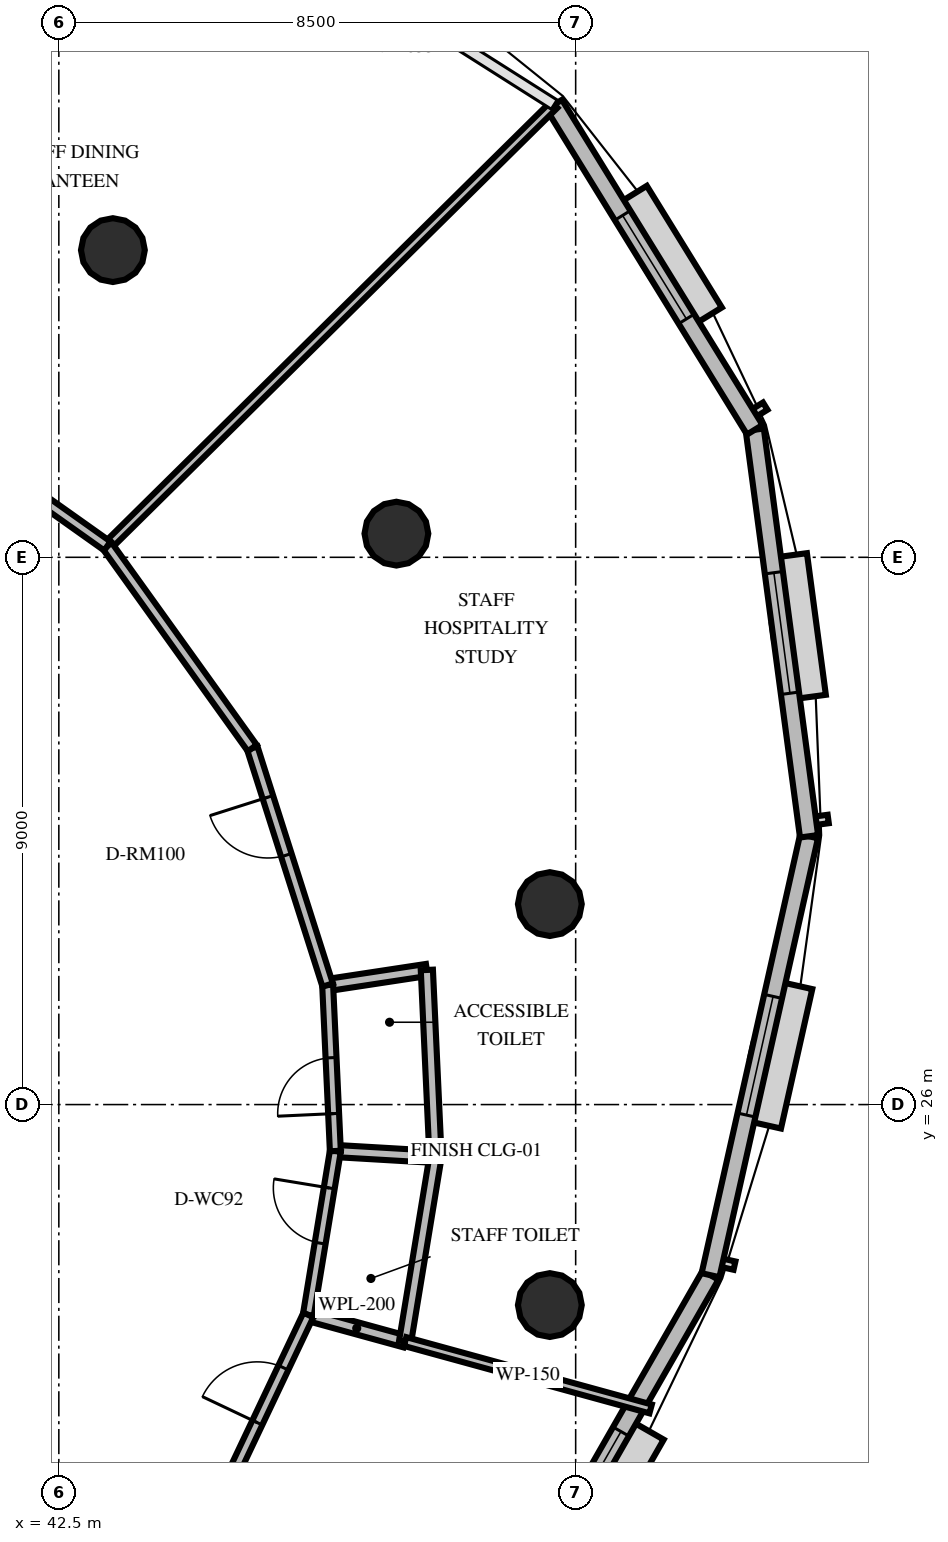
"""IFC4 building model, lengths in metres.
Left out: names, types, materials, properties, quantities, classifications, styles, units other than length and angle.
Written with IfcOpenShell. Run it as: python <this file> out.ifc"""

import sys

from ifc_helpers import new_model, si_unit, direction, frame, frame_2d, origin, origin_2d, place, context, subcontext, project, spatial, rectangle, circle, extrude, element, fill, save


model = new_model("IFC4")
c1 = context("Model", 3, precision=1e-05, world=origin(), true_north=direction((0.0, 1.0)))
c2 = subcontext(c1, "Body", "Model", "MODEL_VIEW")
j1 = project(units=[si_unit("LENGTHUNIT", "METRE"), si_unit("PLANEANGLEUNIT", "RADIAN")], contexts=[c1])
p1 = place(None, origin())
s1 = spatial("IfcSite", under=j1, at=p1, CompositionType="ELEMENT")
p2 = place(p1, origin())
s2 = spatial("IfcBuilding", under=s1, at=p2, CompositionType="ELEMENT")
p3 = place(p2, frame((0.0, 0.0, 216.8)))
s3 = spatial("IfcBuildingStorey", under=s2, at=p3, CompositionType="ELEMENT", Elevation=216.8)
for number, where, z_axis, x_axis in (
    (1, (50.575, 29.297, 0.0), (0.0, 0.0, 1.0), (1.0, 0.0, 0.0)),
    (2, (48.052, 35.389, 0.0), (0.0, 0.0, 1.0), (1.0, 0.0, 0.0)),
    (3, (43.389, 40.052, 0.0), (0.0, 0.0, 1.0), (1.0, 0.0, 0.0)),
    (4, (50.575, 22.703, 0.0), (0.0, 0.0, 1.0), (1.0, 0.0, 0.0)),
):
    element("IfcColumn", number, at=place(p3, frame(where, z_axis=z_axis, x_axis=x_axis)), inside=s3, PredefinedType="COLUMN", context=c2, shape_type="SweptSolid", body=[
        extrude(circle(Radius=0.525, at=origin_2d()), origin(), (0.0, 0.0, 1.0), 3.6),
    ])
p4 = place(p3, frame((49.279, 16.315, 0.0), z_axis=(0.0, 0.0, 1.0), x_axis=(0.496841929848, 0.867841055001, 0.0)))
e5 = element("IfcWall", 5, at=p4, inside=s3, PredefinedType="SOLIDWALL", context=c2, shape_type="SweptSolid", body=[
    extrude(rectangle(XDim=7.927, YDim=0.3, at=frame_2d((3.963, 0.0))), origin(), (0.0, 0.0, 1.0), 2.56),
])
p5 = place(p4, frame((2.964, 0.0, 0.8)))
e6 = element("IfcOpeningElement", 6, at=p5, cuts=e5, PredefinedType="OPENING", context=c2, shape_type="SweptSolid", body=[
    extrude(rectangle(XDim=2.0, YDim=1.85, at=frame_2d((1.0, 0.925))), frame((0.0, 0.16, 0.0), z_axis=(0.0, -1.0, 0.0), x_axis=(1.0, 0.0, 0.0)), (0.0, 0.0, 1.0), 0.32),
])
p6 = place(p3, frame((53.218, 23.194, 0.0), z_axis=(0.0, 0.0, 1.0), x_axis=(0.219068478611, 0.975709486312, 0.0)))
e7 = element("IfcWall", 7, at=p6, inside=s3, PredefinedType="SOLIDWALL", context=c2, shape_type="SweptSolid", body=[
    extrude(rectangle(XDim=7.398, YDim=0.3, at=frame_2d((3.699, 0.0))), origin(), (0.0, 0.0, 1.0), 2.56),
])
p7 = place(p6, frame((2.699, 0.0, 0.8)))
e8 = element("IfcOpeningElement", 8, at=p7, cuts=e7, PredefinedType="OPENING", context=c2, shape_type="SweptSolid", body=[
    extrude(rectangle(XDim=2.0, YDim=1.85, at=frame_2d((1.0, 0.925))), frame((0.0, 0.16, 0.0), z_axis=(0.0, -1.0, 0.0), x_axis=(1.0, 0.0, 0.0)), (0.0, 0.0, 1.0), 0.32),
])
p8 = place(p3, frame((54.838, 30.412, 0.0), z_axis=(0.0, 0.0, 1.0), x_axis=(-0.13236523993, 0.991201010521, 0.0)))
e9 = element("IfcWall", 9, at=p8, inside=s3, PredefinedType="SOLIDWALL", context=c2, shape_type="SweptSolid", body=[
    extrude(rectangle(XDim=6.745, YDim=0.3, at=frame_2d((3.373, 0.0))), origin(), (0.0, 0.0, 1.0), 2.56),
])
p9 = place(p8, frame((2.373, 0.0, 0.8)))
e10 = element("IfcOpeningElement", 10, at=p9, cuts=e9, PredefinedType="OPENING", context=c2, shape_type="SweptSolid", body=[
    extrude(rectangle(XDim=2.0, YDim=1.85, at=frame_2d((1.0, 0.925))), frame((0.0, 0.16, 0.0), z_axis=(0.0, -1.0, 0.0), x_axis=(1.0, 0.0, 0.0)), (0.0, 0.0, 1.0), 0.32),
])
p10 = place(p3, frame((53.946, 37.098, 0.0), z_axis=(0.0, 0.0, 1.0), x_axis=(-0.52501210794, 0.85109475766, 0.0)))
e11 = element("IfcWall", 11, at=p10, inside=s3, PredefinedType="SOLIDWALL", context=c2, shape_type="SweptSolid", body=[
    extrude(rectangle(XDim=6.282, YDim=0.3, at=frame_2d((3.141, 0.0))), origin(), (0.0, 0.0, 1.0), 2.56),
])
p11 = place(p10, frame((2.141, 0.0, 0.8)))
e12 = element("IfcOpeningElement", 12, at=p11, cuts=e11, PredefinedType="OPENING", context=c2, shape_type="SweptSolid", body=[
    extrude(rectangle(XDim=2.0, YDim=1.85, at=frame_2d((1.0, 0.925))), frame((0.0, 0.16, 0.0), z_axis=(0.0, -1.0, 0.0), x_axis=(1.0, 0.0, 0.0)), (0.0, 0.0, 1.0), 0.32),
])
p12 = place(p3, frame((46.604, 22.54, 0.0), z_axis=(0.0, 0.0, 1.0), x_axis=(0.964325407266, -0.264719679853, 0.0)))
e13 = element("IfcWall", 13, at=p12, inside=s3, PredefinedType="PLUMBINGWALL", context=c2, shape_type="SweptSolid", body=[
    extrude(rectangle(XDim=1.65, YDim=0.2, at=frame_2d((0.825, 0.0))), origin(), (0.0, 0.0, 1.0), 2.45),
])
p13 = place(p3, frame((47.048, 25.236, 0.0), z_axis=(0.0, 0.0, 1.0), x_axis=(0.998290661285, -0.058444465867, 0.0)))
e14 = element("IfcWall", 14, at=p13, inside=s3, PredefinedType="PLUMBINGWALL", context=c2, shape_type="SweptSolid", body=[
    extrude(rectangle(XDim=1.65, YDim=0.2, at=frame_2d((0.825, 0.0))), origin(), (0.0, 0.0, 1.0), 2.45),
])
p14 = place(p3, frame((48.195, 22.104, 0.0), z_axis=(0.0, 0.0, 1.0), x_axis=(0.162481728675, 0.986711552505, 0.0)))
e15 = element("IfcWall", 15, at=p14, inside=s3, PredefinedType="PLUMBINGWALL", context=c2, shape_type="SweptSolid", body=[
    extrude(rectangle(XDim=3.077, YDim=0.2, at=frame_2d((1.539, 0.0))), origin(), (0.0, 0.0, 1.0), 2.45),
])
p15 = place(p3, frame((46.604, 22.54, 0.0), z_axis=(0.0, 0.0, 1.0), x_axis=(0.162442572065, 0.986717999623, 0.0)))
e16 = element("IfcWall", 16, at=p15, inside=s3, PredefinedType="PARTITIONING", context=c2, shape_type="SweptSolid", body=[
    extrude(rectangle(XDim=2.732, YDim=0.18, at=frame_2d((1.366, 0.0))), origin(), (0.0, 0.0, 1.0), 2.45),
])
p16 = place(p15, frame((1.197, 0.0, 0.0)))
e17 = element("IfcOpeningElement", 17, at=p16, cuts=e16, PredefinedType="OPENING", context=c2, shape_type="SweptSolid", body=[
    extrude(rectangle(XDim=0.92, YDim=2.1, at=frame_2d((0.46, 1.05))), frame((0.0, 0.1, 0.0), z_axis=(0.0, -1.0, 0.0), x_axis=(1.0, 0.0, 0.0)), (0.0, 0.0, 1.0), 0.2),
])
p17 = place(p3, frame((46.921, 27.966, 0.0), z_axis=(0.0, 0.0, 1.0), x_axis=(0.9886336644, 0.150344529716, 0.0)))
e18 = element("IfcWall", 18, at=p17, inside=s3, PredefinedType="PLUMBINGWALL", context=c2, shape_type="SweptSolid", body=[
    extrude(rectangle(XDim=1.65, YDim=0.2, at=frame_2d((0.825, 0.0))), origin(), (0.0, 0.0, 1.0), 2.45),
])
p18 = place(p3, frame((48.695, 25.14, 0.0), z_axis=(0.0, 0.0, 1.0), x_axis=(-0.046253358654, 0.998929740679, 0.0)))
e19 = element("IfcWall", 19, at=p18, inside=s3, PredefinedType="PLUMBINGWALL", context=c2, shape_type="SweptSolid", body=[
    extrude(rectangle(XDim=3.077, YDim=0.2, at=frame_2d((1.539, 0.0))), origin(), (0.0, 0.0, 1.0), 2.45),
])
p19 = place(p3, frame((47.048, 25.236, 0.0), z_axis=(0.0, 0.0, 1.0), x_axis=(-0.046193926453, 0.998932490791, 0.0)))
e20 = element("IfcWall", 20, at=p19, inside=s3, PredefinedType="PARTITIONING", context=c2, shape_type="SweptSolid", body=[
    extrude(rectangle(XDim=2.732, YDim=0.18, at=frame_2d((1.366, 0.0))), origin(), (0.0, 0.0, 1.0), 2.45),
])
p20 = place(p19, frame((0.616, 0.0, 0.0)))
e21 = element("IfcOpeningElement", 21, at=p20, cuts=e20, PredefinedType="OPENING", context=c2, shape_type="SweptSolid", body=[
    extrude(rectangle(XDim=0.92, YDim=2.1, at=frame_2d((0.46, 1.05))), frame((0.0, 0.1, 0.0), z_axis=(0.0, -1.0, 0.0), x_axis=(1.0, 0.0, 0.0)), (0.0, 0.0, 1.0), 0.2),
])
p21 = place(p3, frame((48.195, 22.104, 0.0), z_axis=(0.0, 0.0, 1.0), x_axis=(0.964331984238, -0.264695719978, 0.0)))
e22 = element("IfcWall", 22, at=p21, inside=s3, PredefinedType="PARTITIONING", context=c2, shape_type="SweptSolid", body=[
    extrude(rectangle(XDim=4.188, YDim=0.15, at=frame_2d((2.094, 0.0))), origin(), (0.0, 0.0, 1.0), 2.45),
])
p22 = place(p3, frame((43.298, 35.185, 0.0), z_axis=(0.0, 0.0, 1.0), x_axis=(0.711430318558, 0.702756644818, 0.0)))
e23 = element("IfcWall", 23, at=p22, inside=s3, PredefinedType="PARTITIONING", context=c2, shape_type="SweptSolid", body=[
    extrude(rectangle(XDim=10.33, YDim=0.15, at=frame_2d((5.165, 0.0))), origin(), (0.0, 0.0, 1.0), 2.45),
])
p23 = place(p3, frame((46.921, 27.966, 0.0), z_axis=(0.0, 0.0, 1.0), x_axis=(-0.30324801656, 0.952911664559, 0.0)))
e24 = element("IfcWall", 24, at=p23, inside=s3, PredefinedType="PARTITIONING", context=c2, shape_type="SweptSolid", body=[
    extrude(rectangle(XDim=4.089, YDim=0.18, at=frame_2d((2.044, 0.0))), origin(), (0.0, 0.0, 1.0), 2.45),
])
p24 = place(p23, frame((2.242, 0.0, 0.0)))
e25 = element("IfcOpeningElement", 25, at=p24, cuts=e24, PredefinedType="OPENING", context=c2, shape_type="SweptSolid", body=[
    extrude(rectangle(XDim=1.0, YDim=2.15, at=frame_2d((0.5, 1.075))), frame((0.0, 0.1, 0.0), z_axis=(0.0, -1.0, 0.0), x_axis=(1.0, 0.0, 0.0)), (0.0, 0.0, 1.0), 0.2),
])
p25 = place(p3, frame((45.681, 31.862, 0.0), z_axis=(0.0, 0.0, 1.0), x_axis=(-0.58281275777, 0.812606478796, 0.0)))
e26 = element("IfcWall", 26, at=p25, inside=s3, PredefinedType="PARTITIONING", context=c2, shape_type="SweptSolid", body=[
    extrude(rectangle(XDim=4.089, YDim=0.18, at=frame_2d((2.045, 0.0))), origin(), (0.0, 0.0, 1.0), 2.45),
])
p26 = place(p3, frame((43.298, 35.185, 0.0), z_axis=(0.0, 0.0, 1.0), x_axis=(-0.815622593255, 0.578584294094, 0.0)))
e27 = element("IfcWall", 27, at=p26, inside=s3, PredefinedType="PARTITIONING", context=c2, shape_type="SweptSolid", body=[
    extrude(rectangle(XDim=4.539, YDim=0.18, at=frame_2d((2.27, 0.0))), origin(), (0.0, 0.0, 1.0), 2.45),
])
p27 = place(p3, frame((44.66, 18.438, 0.0), z_axis=(0.0, 0.0, 1.0), x_axis=(0.428116399969, 0.903723601594, 0.0)))
e28 = element("IfcWall", 28, at=p27, inside=s3, PredefinedType="PARTITIONING", context=c2, shape_type="SweptSolid", body=[
    extrude(rectangle(XDim=4.539, YDim=0.18, at=frame_2d((2.27, 0.0))), origin(), (0.0, 0.0, 1.0), 2.45),
])
p28 = place(p27, frame((2.579, 0.0, 0.0)))
e29 = element("IfcOpeningElement", 29, at=p28, cuts=e28, PredefinedType="OPENING", context=c2, shape_type="SweptSolid", body=[
    extrude(rectangle(XDim=1.0, YDim=2.15, at=frame_2d((0.5, 1.075))), frame((0.0, 0.1, 0.0), z_axis=(0.0, -1.0, 0.0), x_axis=(1.0, 0.0, 0.0)), (0.0, 0.0, 1.0), 0.2),
])
p29 = place(p5, origin())
e30 = element("IfcWindow", 30, at=p29, inside=s3, PartitioningType="SINGLE_PANEL", PredefinedType="WINDOW", context=c2, shape_type="SweptSolid", body=[
    extrude(rectangle(XDim=2.0, YDim=1.85, at=frame_2d((1.0, 0.925))), frame((0.0, 0.03, 0.0), z_axis=(0.0, -1.0, 0.0), x_axis=(1.0, 0.0, 0.0)), (0.0, 0.0, 1.0), 0.06),
])
fill(e6, e30)
p30 = place(p7, origin())
e31 = element("IfcWindow", 31, at=p30, inside=s3, PartitioningType="SINGLE_PANEL", PredefinedType="WINDOW", context=c2, shape_type="SweptSolid", body=[
    extrude(rectangle(XDim=2.0, YDim=1.85, at=frame_2d((1.0, 0.925))), frame((0.0, 0.03, 0.0), z_axis=(0.0, -1.0, 0.0), x_axis=(1.0, 0.0, 0.0)), (0.0, 0.0, 1.0), 0.06),
])
fill(e8, e31)
p31 = place(p9, origin())
e32 = element("IfcWindow", 32, at=p31, inside=s3, PartitioningType="SINGLE_PANEL", PredefinedType="WINDOW", context=c2, shape_type="SweptSolid", body=[
    extrude(rectangle(XDim=2.0, YDim=1.85, at=frame_2d((1.0, 0.925))), frame((0.0, 0.03, 0.0), z_axis=(0.0, -1.0, 0.0), x_axis=(1.0, 0.0, 0.0)), (0.0, 0.0, 1.0), 0.06),
])
fill(e10, e32)
p32 = place(p11, origin())
e33 = element("IfcWindow", 33, at=p32, inside=s3, PartitioningType="SINGLE_PANEL", PredefinedType="WINDOW", context=c2, shape_type="SweptSolid", body=[
    extrude(rectangle(XDim=2.0, YDim=1.85, at=frame_2d((1.0, 0.925))), frame((0.0, 0.03, 0.0), z_axis=(0.0, -1.0, 0.0), x_axis=(1.0, 0.0, 0.0)), (0.0, 0.0, 1.0), 0.06),
])
fill(e12, e33)
p33 = place(p16, origin())
e34 = element("IfcDoor", 34, at=p33, inside=s3, OperationType="SINGLE_SWING_RIGHT", PredefinedType="DOOR", context=c2, shape_type="SweptSolid", body=[
    extrude(rectangle(XDim=0.92, YDim=2.1, at=frame_2d((0.46, 1.05))), frame((0.0, 0.025, 0.0), z_axis=(0.0, -1.0, 0.0), x_axis=(1.0, 0.0, 0.0)), (0.0, 0.0, 1.0), 0.05),
])
fill(e17, e34)
p34 = place(p20, origin())
e35 = element("IfcDoor", 35, at=p34, inside=s3, OperationType="SINGLE_SWING_LEFT", PredefinedType="DOOR", context=c2, shape_type="SweptSolid", body=[
    extrude(rectangle(XDim=0.92, YDim=2.1, at=frame_2d((0.46, 1.05))), frame((0.0, 0.025, 0.0), z_axis=(0.0, -1.0, 0.0), x_axis=(1.0, 0.0, 0.0)), (0.0, 0.0, 1.0), 0.05),
])
fill(e21, e35)
p35 = place(p24, origin())
e36 = element("IfcDoor", 36, at=p35, inside=s3, OperationType="SINGLE_SWING_RIGHT", PredefinedType="DOOR", context=c2, shape_type="SweptSolid", body=[
    extrude(rectangle(XDim=1.0, YDim=2.15, at=frame_2d((0.5, 1.075))), frame((0.0, 0.025, 0.0), z_axis=(0.0, -1.0, 0.0), x_axis=(1.0, 0.0, 0.0)), (0.0, 0.0, 1.0), 0.05),
])
fill(e25, e36)
p36 = place(p28, origin())
e37 = element("IfcDoor", 37, at=p36, inside=s3, OperationType="SINGLE_SWING_LEFT", PredefinedType="DOOR", context=c2, shape_type="SweptSolid", body=[
    extrude(rectangle(XDim=1.0, YDim=2.15, at=frame_2d((0.5, 1.075))), frame((0.0, 0.025, 0.0), z_axis=(0.0, -1.0, 0.0), x_axis=(1.0, 0.0, 0.0)), (0.0, 0.0, 1.0), 0.05),
])
fill(e29, e37)
save(model, sys.argv[1])
